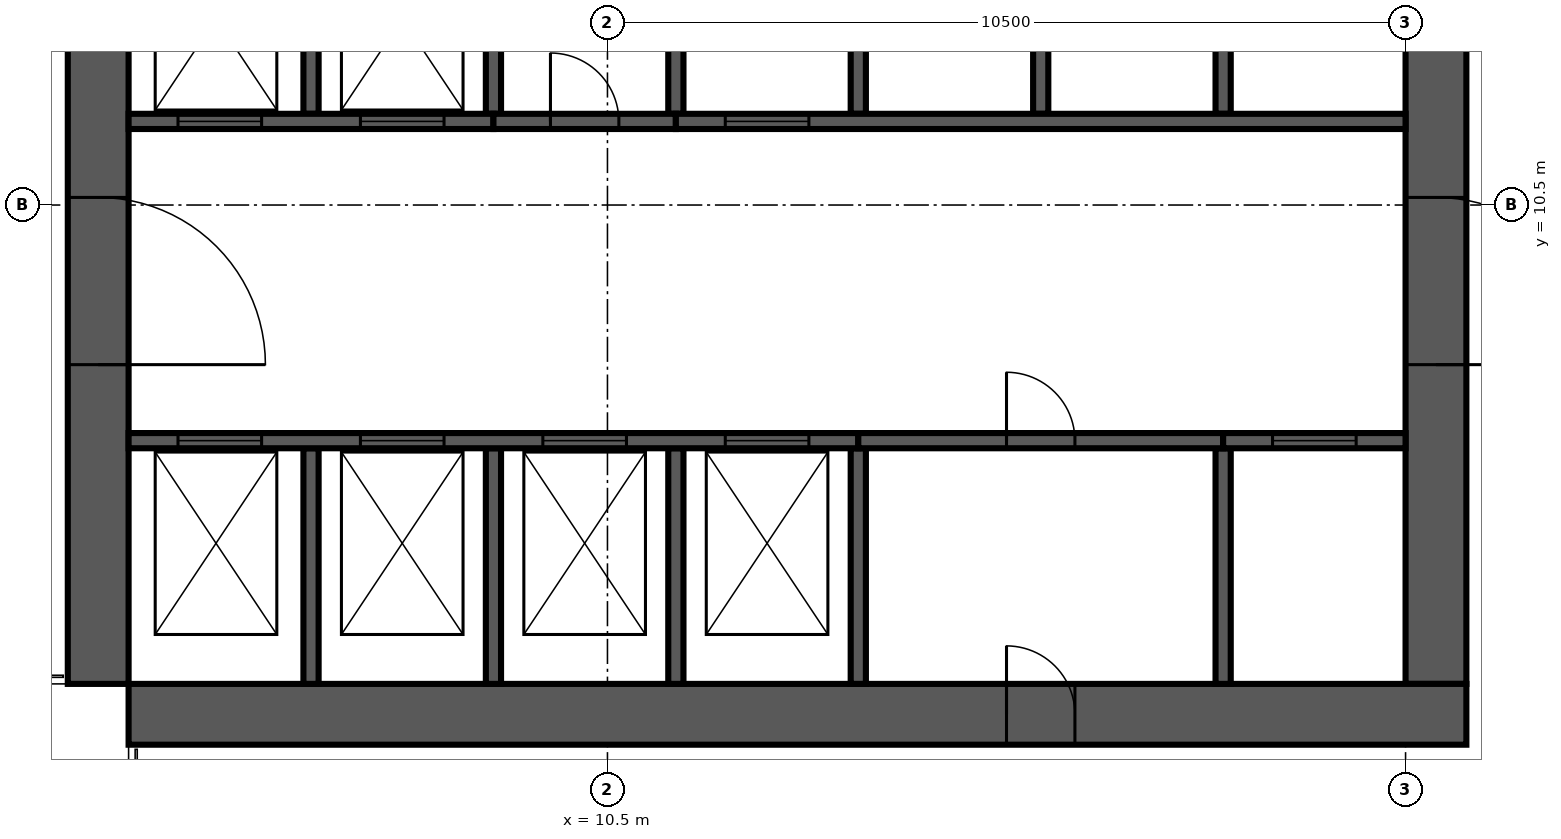
"""IFC4 building model, lengths in metres.
Left out: names, types, materials, properties, quantities, classifications, styles, units other than length and angle.
Written with IfcOpenShell. Run it as: python <this file> out.ifc"""

import sys

from ifc_helpers import new_model, si_unit, direction, frame, frame_2d, origin, place, context, subcontext, project, spatial, rectangle, extrude, source, transform, mapped, element, fill, save


model = new_model("IFC4")
c1 = context("Model", 3, precision=1e-05, world=origin(), true_north=direction((0.0, 1.0)))
c2 = subcontext(c1, "Body", "Model", "MODEL_VIEW")
j1 = project(units=[si_unit("LENGTHUNIT", "METRE"), si_unit("PLANEANGLEUNIT", "RADIAN")], contexts=[c1])
p1 = place(None, origin())
s1 = spatial("IfcSite", under=j1, at=p1, CompositionType="ELEMENT")
p2 = place(p1, origin())
s2 = spatial("IfcBuilding", under=s1, at=p2, CompositionType="ELEMENT")
p3 = place(p2, frame((0.0, 0.0, 277.0)))
s3 = spatial("IfcBuildingStorey", under=s2, at=p3, CompositionType="ELEMENT", Elevation=277.0)
p4 = place(p3, frame((3.8, 4.2, 0.0), z_axis=(0.0, 0.0, 1.0), x_axis=(0.0, 1.0, 0.0)))
e1 = element("IfcWall", 1, at=p4, inside=s3, PredefinedType="SHEAR", context=c2, shape_type="SweptSolid", body=[
    extrude(rectangle(XDim=17.6, YDim=0.8, at=frame_2d((8.8, 0.0))), origin(), (0.0, 0.0, 1.0), 7.5),
])
m1 = source(origin(), c2, "Body", "SweptSolid", [
    extrude(rectangle(XDim=2.2, YDim=2.1, at=frame_2d((1.1, 1.05))), frame((0.0, 0.41, 0.0), z_axis=(0.0, -1.0, 0.0), x_axis=(1.0, 0.0, 0.0)), (0.0, 0.0, 1.0), 0.82),
])
p5 = place(p4, frame((4.2, 0.0, 0.0)))
e2 = element("IfcOpeningElement", 2, at=p5, cuts=e1, PredefinedType="OPENING", context=c2, shape_type="MappedRepresentation", body=[
    mapped(m1, transform((0.0, 0.0, 0.0), scale=1.0)),
])
p6 = place(p3, frame((21.4, 4.2, 0.0), z_axis=(0.0, 0.0, 1.0), x_axis=(0.0, 1.0, 0.0)))
e3 = element("IfcWall", 3, at=p6, inside=s3, PredefinedType="SHEAR", context=c2, shape_type="SweptSolid", body=[
    extrude(rectangle(XDim=16.8, YDim=0.8, at=frame_2d((8.4, 0.0))), origin(), (0.0, 0.0, 1.0), 7.5),
])
p7 = place(p6, frame((4.2, 0.0, 0.0)))
e4 = element("IfcOpeningElement", 4, at=p7, cuts=e3, PredefinedType="OPENING", context=c2, shape_type="MappedRepresentation", body=[
    mapped(m1, transform((0.0, 0.0, 0.0), scale=1.0)),
])
m2 = source(origin(), c2, "Body", "SweptSolid", [
    extrude(rectangle(XDim=1.2, YDim=2.1, at=frame_2d((0.6, 1.05))), frame((0.0, 0.41, 0.0), z_axis=(0.0, -1.0, 0.0), x_axis=(1.0, 0.0, 0.0)), (0.0, 0.0, 1.0), 0.82),
])
p8 = place(p6, frame((14.7, 0.0, 0.0)))
e5 = element("IfcOpeningElement", 5, at=p8, cuts=e3, PredefinedType="OPENING", context=c2, shape_type="MappedRepresentation", body=[
    mapped(m2, transform((0.0, 0.0, 0.0), scale=1.0)),
])
m3 = source(origin(), c2, "Body", "SweptSolid", [
    extrude(rectangle(XDim=17.6, YDim=0.8, at=frame_2d((8.8, 0.0))), origin(), (0.0, 0.0, 1.0), 7.5),
])
p9 = place(p3, frame((4.2, 3.8, 0.0), z_axis=(0.0, 0.0, 1.0), x_axis=(1.0, 0.0, 0.0)))
e6 = element("IfcWall", 6, at=p9, inside=s3, PredefinedType="SHEAR", context=c2, shape_type="MappedRepresentation", body=[
    mapped(m3, transform((0.0, 0.0, 0.0), scale=1.0)),
])
m4 = source(origin(), c2, "Body", "SweptSolid", [
    extrude(rectangle(XDim=0.9, YDim=2.1, at=frame_2d((0.45, 1.05))), frame((0.0, 0.41, 0.0), z_axis=(0.0, -1.0, 0.0), x_axis=(1.0, 0.0, 0.0)), (0.0, 0.0, 1.0), 0.82),
])
p10 = place(p9, frame((11.55, 0.0, 0.0)))
e7 = element("IfcOpeningElement", 7, at=p10, cuts=e6, PredefinedType="OPENING", context=c2, shape_type="MappedRepresentation", body=[
    mapped(m4, transform((0.0, 0.0, 0.0), scale=1.0)),
])
m5 = source(origin(), c2, "Body", "SweptSolid", [
    extrude(rectangle(XDim=3.1, YDim=0.2, at=frame_2d((1.55, 0.0))), origin(), (0.0, 0.0, 1.0), 7.5),
])
for number, where, z_axis, x_axis in (
    (8, (6.6, 4.2, 0.0), (0.0, 0.0, 1.0), (0.0, 1.0, 0.0)),
    (9, (9.0, 4.2, 0.0), (0.0, 0.0, 1.0), (0.0, 1.0, 0.0)),
    (10, (11.4, 4.2, 0.0), (0.0, 0.0, 1.0), (0.0, 1.0, 0.0)),
):
    element("IfcWall", number, at=place(p3, frame(where, z_axis=z_axis, x_axis=x_axis)), inside=s3, PredefinedType="SOLIDWALL", context=c2, shape_type="MappedRepresentation", body=[
        mapped(m5, transform((0.0, 0.0, 0.0), scale=1.0)),
    ])
p11 = place(p3, frame((13.8, 4.2, 0.0), z_axis=(0.0, 0.0, 1.0), x_axis=(0.0, 1.0, 0.0)))
e11 = element("IfcWall", 11, at=p11, inside=s3, PredefinedType="SOLIDWALL", context=c2, shape_type="SweptSolid", body=[
    extrude(rectangle(XDim=3.1, YDim=0.2, at=frame_2d((1.55, 0.0))), origin(), (0.0, 0.0, 1.0), 7.1),
])
m6 = source(origin(), c2, "Body", "SweptSolid", [
    extrude(rectangle(XDim=3.1, YDim=0.2, at=frame_2d((1.55, 0.0))), origin(), (0.0, 0.0, 1.0), 7.1),
])
p12 = place(p3, frame((18.6, 4.2, 0.0), z_axis=(0.0, 0.0, 1.0), x_axis=(0.0, 1.0, 0.0)))
e12 = element("IfcWall", 12, at=p12, inside=s3, PredefinedType="SOLIDWALL", context=c2, shape_type="MappedRepresentation", body=[
    mapped(m6, transform((0.0, 0.0, 0.0), scale=1.0)),
])
m7 = source(origin(), c2, "Body", "SweptSolid", [
    extrude(rectangle(XDim=3.0, YDim=0.2, at=frame_2d((1.5, 0.0))), origin(), (0.0, 0.0, 1.0), 7.5),
])
p13 = place(p3, frame((6.6, 11.7, 0.0), z_axis=(0.0, 0.0, 1.0), x_axis=(0.0, 1.0, 0.0)))
e13 = element("IfcWall", 13, at=p13, inside=s3, PredefinedType="SOLIDWALL", context=c2, shape_type="MappedRepresentation", body=[
    mapped(m7, transform((0.0, 0.0, 0.0), scale=1.0)),
])
m8 = source(origin(), c2, "Body", "SweptSolid", [
    extrude(rectangle(XDim=3.0, YDim=0.2, at=frame_2d((1.5, 0.0))), origin(), (0.0, 0.0, 1.0), 7.1),
])
for number, where, z_axis, x_axis in (
    (14, (9.0, 11.7, 0.0), (0.0, 0.0, 1.0), (0.0, 1.0, 0.0)),
    (15, (11.4, 11.7, 0.0), (0.0, 0.0, 1.0), (0.0, 1.0, 0.0)),
):
    element("IfcWall", number, at=place(p3, frame(where, z_axis=z_axis, x_axis=x_axis)), inside=s3, PredefinedType="SOLIDWALL", context=c2, shape_type="MappedRepresentation", body=[
        mapped(m8, transform((0.0, 0.0, 0.0), scale=1.0)),
    ])
for number, where, z_axis, x_axis in (
    (16, (13.8, 11.7, 0.0), (0.0, 0.0, 1.0), (0.0, 1.0, 0.0)),
    (17, (16.2, 11.7, 0.0), (0.0, 0.0, 1.0), (0.0, 1.0, 0.0)),
    (18, (18.6, 11.7, 0.0), (0.0, 0.0, 1.0), (0.0, 1.0, 0.0)),
):
    element("IfcWall", number, at=place(p3, frame(where, z_axis=z_axis, x_axis=x_axis)), inside=s3, PredefinedType="SOLIDWALL", context=c2, shape_type="MappedRepresentation", body=[
        mapped(m7, transform((0.0, 0.0, 0.0), scale=1.0)),
    ])
m9 = source(origin(), c2, "Body", "SweptSolid", [
    extrude(rectangle(XDim=9.6, YDim=0.2, at=frame_2d((4.8, 0.0))), origin(), (0.0, 0.0, 1.0), 7.5),
])
p14 = place(p3, frame((4.2, 7.4, 0.0), z_axis=(0.0, 0.0, 1.0), x_axis=(1.0, 0.0, 0.0)))
e19 = element("IfcWall", 19, at=p14, inside=s3, PredefinedType="SOLIDWALL", context=c2, shape_type="MappedRepresentation", body=[
    mapped(m9, transform((0.0, 0.0, 0.0), scale=1.0)),
])
m10 = source(origin(), c2, "Body", "SweptSolid", [
    extrude(rectangle(XDim=1.1, YDim=2.1, at=frame_2d((0.55, 1.05))), frame((0.0, 0.11, 0.0), z_axis=(0.0, -1.0, 0.0), x_axis=(1.0, 0.0, 0.0)), (0.0, 0.0, 1.0), 0.22),
])
p15 = place(p14, frame((0.65, 0.0, 0.0)))
e20 = element("IfcOpeningElement", 20, at=p15, cuts=e19, PredefinedType="OPENING", context=c2, shape_type="MappedRepresentation", body=[
    mapped(m10, transform((0.0, 0.0, 0.0), scale=1.0)),
])
p16 = place(p14, frame((3.05, 0.0, 0.0)))
e21 = element("IfcOpeningElement", 21, at=p16, cuts=e19, PredefinedType="OPENING", context=c2, shape_type="MappedRepresentation", body=[
    mapped(m10, transform((0.0, 0.0, 0.0), scale=1.0)),
])
p17 = place(p14, frame((5.45, 0.0, 0.0)))
e22 = element("IfcOpeningElement", 22, at=p17, cuts=e19, PredefinedType="OPENING", context=c2, shape_type="MappedRepresentation", body=[
    mapped(m10, transform((0.0, 0.0, 0.0), scale=1.0)),
])
p18 = place(p14, frame((7.85, 0.0, 0.0)))
e23 = element("IfcOpeningElement", 23, at=p18, cuts=e19, PredefinedType="OPENING", context=c2, shape_type="MappedRepresentation", body=[
    mapped(m10, transform((0.0, 0.0, 0.0), scale=1.0)),
])
p19 = place(p3, frame((13.8, 7.4, 0.0), z_axis=(0.0, 0.0, 1.0), x_axis=(1.0, 0.0, 0.0)))
e24 = element("IfcWall", 24, at=p19, inside=s3, PredefinedType="SOLIDWALL", context=c2, shape_type="SweptSolid", body=[
    extrude(rectangle(XDim=4.8, YDim=0.2, at=frame_2d((2.4, 0.0))), origin(), (0.0, 0.0, 1.0), 7.1),
])
m11 = source(origin(), c2, "Body", "SweptSolid", [
    extrude(rectangle(XDim=0.9, YDim=2.1, at=frame_2d((0.45, 1.05))), frame((0.0, 0.11, 0.0), z_axis=(0.0, -1.0, 0.0), x_axis=(1.0, 0.0, 0.0)), (0.0, 0.0, 1.0), 0.22),
])
p20 = place(p19, frame((1.95, 0.0, 0.0)))
e25 = element("IfcOpeningElement", 25, at=p20, cuts=e24, PredefinedType="OPENING", context=c2, shape_type="MappedRepresentation", body=[
    mapped(m11, transform((0.0, 0.0, 0.0), scale=1.0)),
])
p21 = place(p3, frame((18.6, 7.4, 0.0), z_axis=(0.0, 0.0, 1.0), x_axis=(1.0, 0.0, 0.0)))
e26 = element("IfcWall", 26, at=p21, inside=s3, PredefinedType="SOLIDWALL", context=c2, shape_type="SweptSolid", body=[
    extrude(rectangle(XDim=2.4, YDim=0.2, at=frame_2d((1.2, 0.0))), origin(), (0.0, 0.0, 1.0), 7.5),
])
p22 = place(p21, frame((0.65, 0.0, 0.0)))
e27 = element("IfcOpeningElement", 27, at=p22, cuts=e26, PredefinedType="OPENING", context=c2, shape_type="MappedRepresentation", body=[
    mapped(m10, transform((0.0, 0.0, 0.0), scale=1.0)),
])
m12 = source(origin(), c2, "Body", "SweptSolid", [
    extrude(rectangle(XDim=4.8, YDim=0.2, at=frame_2d((2.4, 0.0))), origin(), (0.0, 0.0, 1.0), 7.5),
])
p23 = place(p3, frame((4.2, 11.6, 0.0), z_axis=(0.0, 0.0, 1.0), x_axis=(1.0, 0.0, 0.0)))
e28 = element("IfcWall", 28, at=p23, inside=s3, PredefinedType="SOLIDWALL", context=c2, shape_type="MappedRepresentation", body=[
    mapped(m12, transform((0.0, 0.0, 0.0), scale=1.0)),
])
p24 = place(p23, frame((0.65, 0.0, 0.0)))
e29 = element("IfcOpeningElement", 29, at=p24, cuts=e28, PredefinedType="OPENING", context=c2, shape_type="MappedRepresentation", body=[
    mapped(m10, transform((0.0, 0.0, 0.0), scale=1.0)),
])
p25 = place(p23, frame((3.05, 0.0, 0.0)))
e30 = element("IfcOpeningElement", 30, at=p25, cuts=e28, PredefinedType="OPENING", context=c2, shape_type="MappedRepresentation", body=[
    mapped(m10, transform((0.0, 0.0, 0.0), scale=1.0)),
])
m13 = source(origin(), c2, "Body", "SweptSolid", [
    extrude(rectangle(XDim=2.4, YDim=0.2, at=frame_2d((1.2, 0.0))), origin(), (0.0, 0.0, 1.0), 7.1),
])
p26 = place(p3, frame((9.0, 11.6, 0.0), z_axis=(0.0, 0.0, 1.0), x_axis=(1.0, 0.0, 0.0)))
e31 = element("IfcWall", 31, at=p26, inside=s3, PredefinedType="SOLIDWALL", context=c2, shape_type="MappedRepresentation", body=[
    mapped(m13, transform((0.0, 0.0, 0.0), scale=1.0)),
])
p27 = place(p26, frame((0.75, 0.0, 0.0)))
e32 = element("IfcOpeningElement", 32, at=p27, cuts=e31, PredefinedType="OPENING", context=c2, shape_type="MappedRepresentation", body=[
    mapped(m11, transform((0.0, 0.0, 0.0), scale=1.0)),
])
p28 = place(p3, frame((11.4, 11.6, 0.0), z_axis=(0.0, 0.0, 1.0), x_axis=(1.0, 0.0, 0.0)))
e33 = element("IfcWall", 33, at=p28, inside=s3, PredefinedType="SOLIDWALL", context=c2, shape_type="MappedRepresentation", body=[
    mapped(m9, transform((0.0, 0.0, 0.0), scale=1.0)),
])
p29 = place(p28, frame((0.65, 0.0, 0.0)))
e34 = element("IfcOpeningElement", 34, at=p29, cuts=e33, PredefinedType="OPENING", context=c2, shape_type="MappedRepresentation", body=[
    mapped(m10, transform((0.0, 0.0, 0.0), scale=1.0)),
])
m14 = source(origin(), c2, "Body", "SweptSolid", [
    extrude(rectangle(XDim=1.1, YDim=2.1, at=frame_2d((0.55, 1.05))), frame((0.0, 0.025, 0.0), z_axis=(0.0, -1.0, 0.0), x_axis=(1.0, 0.0, 0.0)), (0.0, 0.0, 1.0), 0.05),
])
p30 = place(p15, origin())
e35 = element("IfcDoor", 35, at=p30, inside=s3, OperationType="SLIDING_TO_LEFT", PredefinedType="DOOR", context=c2, shape_type="MappedRepresentation", body=[
    mapped(m14, transform((0.0, 0.0, 0.0), scale=1.0)),
])
fill(e20, e35)
p31 = place(p16, origin())
e36 = element("IfcDoor", 36, at=p31, inside=s3, OperationType="SLIDING_TO_LEFT", PredefinedType="DOOR", context=c2, shape_type="MappedRepresentation", body=[
    mapped(m14, transform((0.0, 0.0, 0.0), scale=1.0)),
])
fill(e21, e36)
p32 = place(p17, origin())
e37 = element("IfcDoor", 37, at=p32, inside=s3, OperationType="SLIDING_TO_LEFT", PredefinedType="DOOR", context=c2, shape_type="MappedRepresentation", body=[
    mapped(m14, transform((0.0, 0.0, 0.0), scale=1.0)),
])
fill(e22, e37)
p33 = place(p18, origin())
e38 = element("IfcDoor", 38, at=p33, inside=s3, OperationType="SLIDING_TO_LEFT", PredefinedType="DOOR", context=c2, shape_type="MappedRepresentation", body=[
    mapped(m14, transform((0.0, 0.0, 0.0), scale=1.0)),
])
fill(e23, e38)
m15 = source(origin(), c2, "Body", "SweptSolid", [
    extrude(rectangle(XDim=0.9, YDim=2.1, at=frame_2d((0.45, 1.05))), frame((0.0, 0.025, 0.0), z_axis=(0.0, -1.0, 0.0), x_axis=(1.0, 0.0, 0.0)), (0.0, 0.0, 1.0), 0.05),
])
p34 = place(p20, origin())
e39 = element("IfcDoor", 39, at=p34, inside=s3, OperationType="SINGLE_SWING_LEFT", PredefinedType="DOOR", context=c2, shape_type="MappedRepresentation", body=[
    mapped(m15, transform((0.0, 0.0, 0.0), scale=1.0)),
])
fill(e25, e39)
p35 = place(p22, origin())
e40 = element("IfcDoor", 40, at=p35, inside=s3, OperationType="SLIDING_TO_LEFT", PredefinedType="DOOR", context=c2, shape_type="MappedRepresentation", body=[
    mapped(m14, transform((0.0, 0.0, 0.0), scale=1.0)),
])
fill(e27, e40)
p36 = place(p24, origin())
e41 = element("IfcDoor", 41, at=p36, inside=s3, OperationType="SLIDING_TO_LEFT", PredefinedType="DOOR", context=c2, shape_type="MappedRepresentation", body=[
    mapped(m14, transform((0.0, 0.0, 0.0), scale=1.0)),
])
fill(e29, e41)
p37 = place(p25, origin())
e42 = element("IfcDoor", 42, at=p37, inside=s3, OperationType="SLIDING_TO_LEFT", PredefinedType="DOOR", context=c2, shape_type="MappedRepresentation", body=[
    mapped(m14, transform((0.0, 0.0, 0.0), scale=1.0)),
])
fill(e30, e42)
p38 = place(p27, origin())
e43 = element("IfcDoor", 43, at=p38, inside=s3, OperationType="SINGLE_SWING_LEFT", PredefinedType="DOOR", context=c2, shape_type="MappedRepresentation", body=[
    mapped(m15, transform((0.0, 0.0, 0.0), scale=1.0)),
])
fill(e32, e43)
p39 = place(p29, origin())
e44 = element("IfcDoor", 44, at=p39, inside=s3, OperationType="SLIDING_TO_LEFT", PredefinedType="DOOR", context=c2, shape_type="MappedRepresentation", body=[
    mapped(m14, transform((0.0, 0.0, 0.0), scale=1.0)),
])
fill(e34, e44)
m16 = source(origin(), c2, "Body", "SweptSolid", [
    extrude(rectangle(XDim=2.2, YDim=2.1, at=frame_2d((1.1, 1.05))), frame((0.0, 0.025, 0.0), z_axis=(0.0, -1.0, 0.0), x_axis=(1.0, 0.0, 0.0)), (0.0, 0.0, 1.0), 0.05),
])
p40 = place(p7, origin())
e45 = element("IfcDoor", 45, at=p40, inside=s3, OperationType="DOUBLE_DOOR_SINGLE_SWING", PredefinedType="DOOR", context=c2, shape_type="MappedRepresentation", body=[
    mapped(m16, transform((0.0, 0.0, 0.0), scale=1.0)),
])
fill(e4, e45)
p41 = place(p5, origin())
e46 = element("IfcDoor", 46, at=p41, inside=s3, OperationType="DOUBLE_DOOR_SINGLE_SWING", PredefinedType="DOOR", context=c2, shape_type="MappedRepresentation", body=[
    mapped(m16, transform((0.0, 0.0, 0.0), scale=1.0)),
])
fill(e2, e46)
p42 = place(p10, origin())
e47 = element("IfcDoor", 47, at=p42, inside=s3, OperationType="SINGLE_SWING_LEFT", PredefinedType="DOOR", context=c2, shape_type="MappedRepresentation", body=[
    mapped(m15, transform((0.0, 0.0, 0.0), scale=1.0)),
])
fill(e7, e47)
save(model, sys.argv[1])
